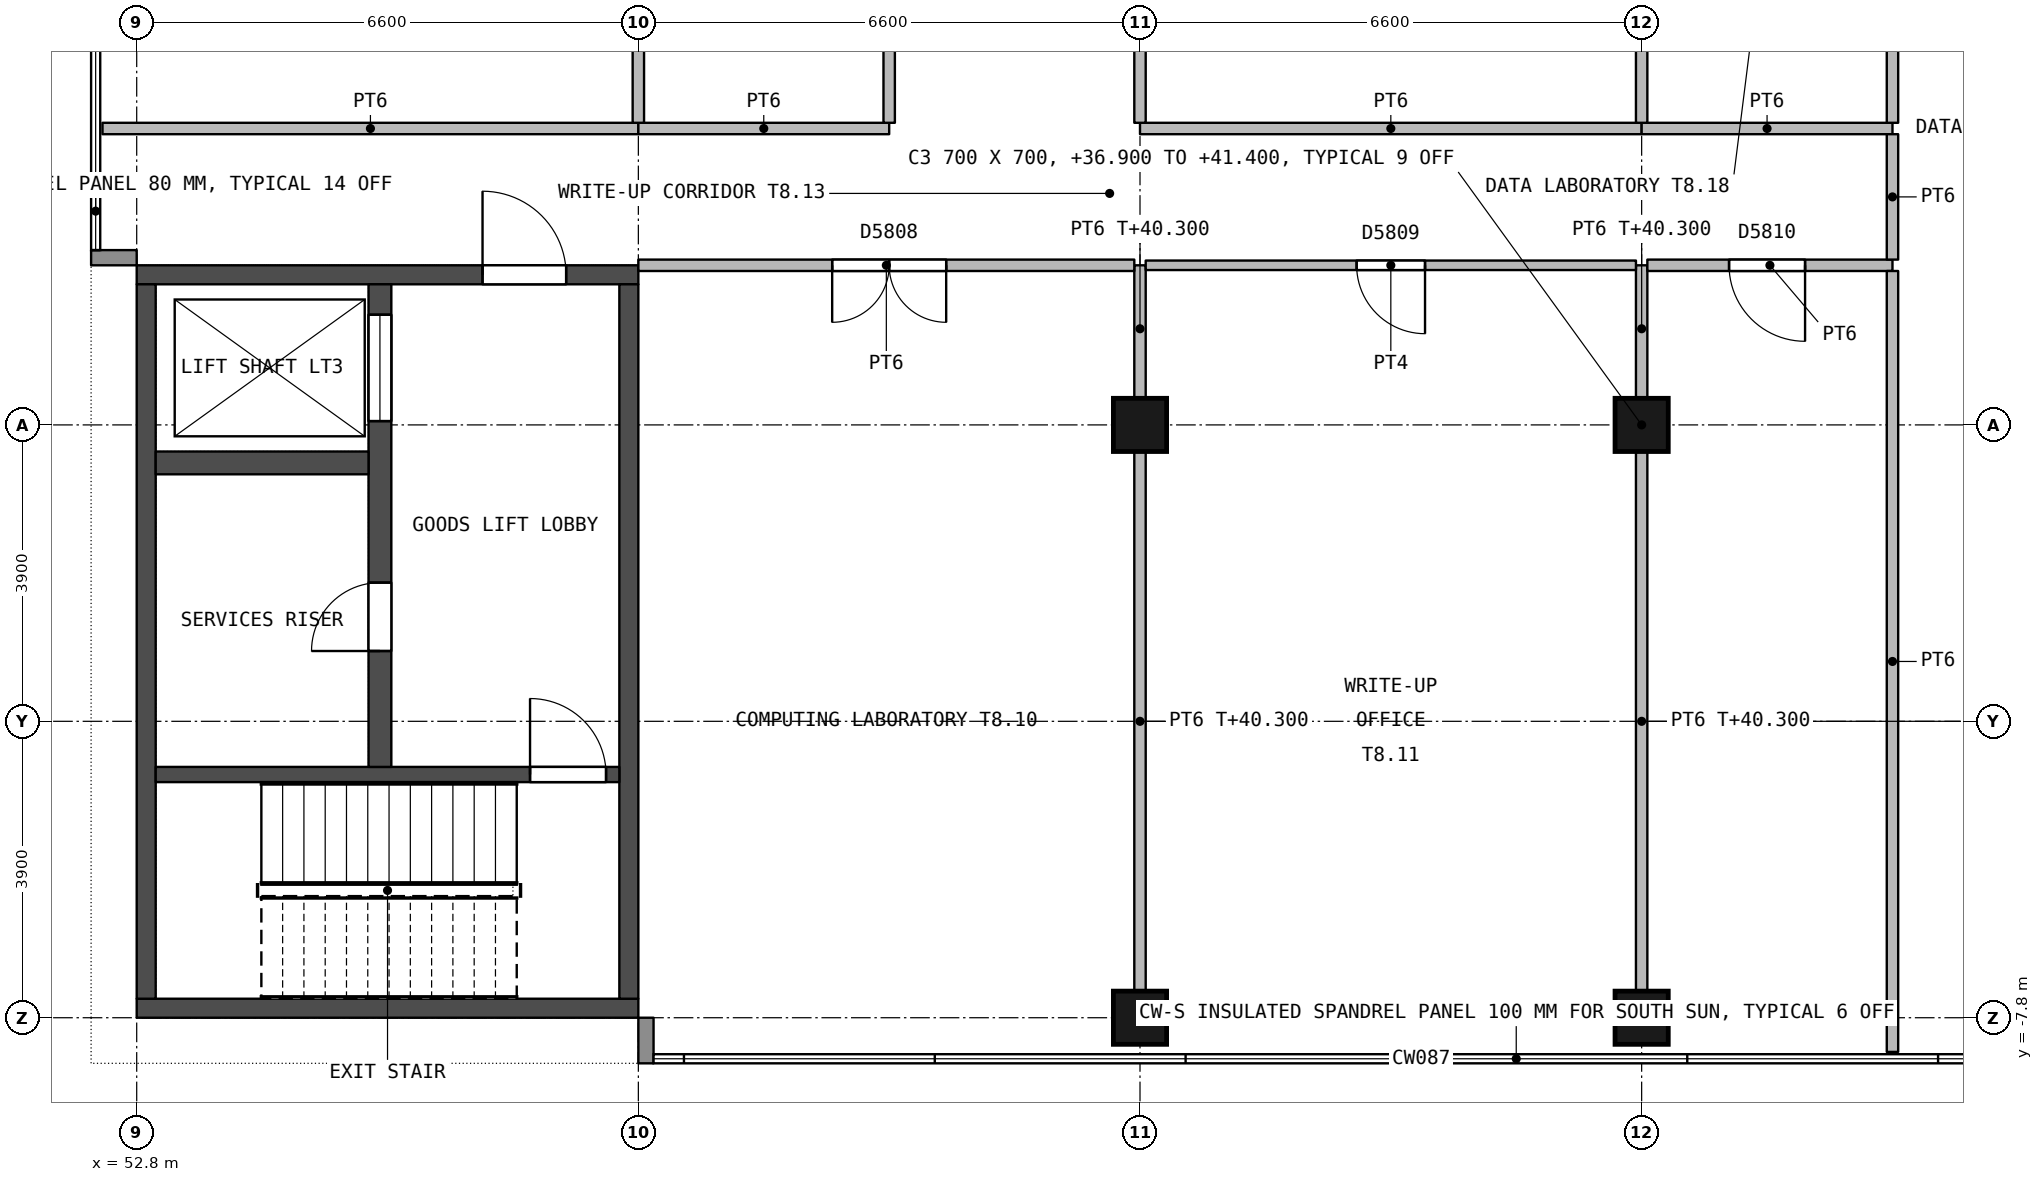
"""IFC4 building model, lengths in metres.
Left out: names, types, materials, properties, quantities, classifications, styles, units other than length and angle.
Written with IfcOpenShell. Run it as: python <this file> out.ifc"""

import sys

from ifc_helpers import new_model, si_unit, direction, frame, frame_2d, origin, origin_2d, place, context, subcontext, project, spatial, rectangle, extrude, element, fill, save


model = new_model("IFC4")
c1 = context("Model", 3, precision=1e-05, world=origin(), true_north=direction((0.0, 1.0)))
c2 = subcontext(c1, "Body", "Model", "MODEL_VIEW")
j1 = project(units=[si_unit("LENGTHUNIT", "METRE"), si_unit("PLANEANGLEUNIT", "RADIAN")], contexts=[c1])
p1 = place(None, origin())
s1 = spatial("IfcSite", under=j1, at=p1, CompositionType="ELEMENT")
p2 = place(p1, origin())
s2 = spatial("IfcBuilding", under=s1, at=p2, CompositionType="ELEMENT")
p3 = place(p2, frame((0.0, 0.0, 36.9)))
s3 = spatial("IfcBuildingStorey", under=s2, at=p3, CompositionType="ELEMENT", Elevation=36.9)
for number, where, z_axis, x_axis in (
    (1, (66.0, -7.8, 0.0), (0.0, 0.0, 1.0), (1.0, 0.0, 0.0)),
    (2, (66.0, 0.0, 0.0), (0.0, 0.0, 1.0), (1.0, 0.0, 0.0)),
    (3, (72.6, -7.8, 0.0), (0.0, 0.0, 1.0), (1.0, 0.0, 0.0)),
    (4, (72.6, 0.0, 0.0), (0.0, 0.0, 1.0), (1.0, 0.0, 0.0)),
):
    element("IfcColumn", number, at=place(p3, frame(where, z_axis=z_axis, x_axis=x_axis)), inside=s3, PredefinedType="COLUMN", context=c2, shape_type="SweptSolid", body=[
        extrude(rectangle(XDim=0.7, YDim=0.7, at=origin_2d()), origin(), (0.0, 0.0, 1.0), 4.5),
    ])
p4 = place(p3, frame((59.4, 1.975, 0.0), z_axis=(0.0, 0.0, 1.0), x_axis=(-1.0, 0.0, 0.0)))
e5 = element("IfcWall", 5, at=p4, inside=s3, PredefinedType="SHEAR", context=c2, shape_type="SweptSolid", body=[
    extrude(rectangle(XDim=6.6, YDim=0.25, at=frame_2d((3.3, 0.0))), origin(), (0.0, 0.0, 1.0), 4.2),
])
p5 = place(p4, frame((0.95, 0.0, 0.0)))
e6 = element("IfcOpeningElement", 6, at=p5, cuts=e5, PredefinedType="OPENING", context=c2, shape_type="SweptSolid", body=[
    extrude(rectangle(XDim=1.1, YDim=2.1, at=frame_2d((0.55, 1.05))), frame((0.0, 0.135, 0.0), z_axis=(0.0, -1.0, 0.0), x_axis=(1.0, 0.0, 0.0)), (0.0, 0.0, 1.0), 0.27),
])
p6 = place(p3, frame((59.4, -7.675, 0.0), z_axis=(0.0, 0.0, 1.0), x_axis=(-1.0, 0.0, 0.0)))
e7 = element("IfcWall", 7, at=p6, inside=s3, PredefinedType="SHEAR", context=c2, shape_type="SweptSolid", body=[
    extrude(rectangle(XDim=6.6, YDim=0.25, at=frame_2d((3.3, 0.0))), origin(), (0.0, 0.0, 1.0), 4.2),
])
for number, where, z_axis, x_axis in (
    (8, (59.275, 1.85, 0.0), (0.0, 0.0, 1.0), (0.0, -1.0, 0.0)),
    (9, (52.925, 1.85, 0.0), (0.0, 0.0, 1.0), (0.0, -1.0, 0.0)),
):
    element("IfcWall", number, at=place(p3, frame(where, z_axis=z_axis, x_axis=x_axis)), inside=s3, PredefinedType="SHEAR", context=c2, shape_type="SweptSolid", body=[
        extrude(rectangle(XDim=9.4, YDim=0.25, at=frame_2d((4.7, 0.0))), origin(), (0.0, 0.0, 1.0), 4.2),
    ])
p7 = place(p3, frame((59.15, -4.6, 0.0), z_axis=(0.0, 0.0, 1.0), x_axis=(-1.0, 0.0, 0.0)))
e10 = element("IfcWall", 10, at=p7, inside=s3, PredefinedType="SHEAR", context=c2, shape_type="SweptSolid", body=[
    extrude(rectangle(XDim=6.1, YDim=0.2, at=frame_2d((3.05, 0.0))), origin(), (0.0, 0.0, 1.0), 4.2),
])
p8 = place(p7, frame((0.175, 0.0, 0.0)))
e11 = element("IfcOpeningElement", 11, at=p8, cuts=e10, PredefinedType="OPENING", context=c2, shape_type="SweptSolid", body=[
    extrude(rectangle(XDim=1.0, YDim=2.1, at=frame_2d((0.5, 1.05))), frame((0.0, 0.11, 0.0), z_axis=(0.0, -1.0, 0.0), x_axis=(1.0, 0.0, 0.0)), (0.0, 0.0, 1.0), 0.22),
])
p9 = place(p3, frame((56.0, 1.85, 0.0), z_axis=(0.0, 0.0, 1.0), x_axis=(0.0, -1.0, 0.0)))
e12 = element("IfcWall", 12, at=p9, inside=s3, PredefinedType="SHEAR", context=c2, shape_type="SweptSolid", body=[
    extrude(rectangle(XDim=6.35, YDim=0.3, at=frame_2d((3.175, 0.0))), origin(), (0.0, 0.0, 1.0), 4.2),
])
p10 = place(p9, frame((3.925, 0.0, 0.0)))
e13 = element("IfcOpeningElement", 13, at=p10, cuts=e12, PredefinedType="OPENING", context=c2, shape_type="SweptSolid", body=[
    extrude(rectangle(XDim=0.9, YDim=2.1, at=frame_2d((0.45, 1.05))), frame((0.0, 0.16, 0.0), z_axis=(0.0, -1.0, 0.0), x_axis=(1.0, 0.0, 0.0)), (0.0, 0.0, 1.0), 0.32),
])
p11 = place(p9, frame((0.4, 0.0, 0.0)))
e14 = element("IfcOpeningElement", 14, at=p11, cuts=e12, PredefinedType="OPENING", context=c2, shape_type="SweptSolid", body=[
    extrude(rectangle(XDim=1.4, YDim=2.4, at=frame_2d((0.7, 1.2))), frame((0.0, 0.16, 0.0), z_axis=(0.0, -1.0, 0.0), x_axis=(1.0, 0.0, 0.0)), (0.0, 0.0, 1.0), 0.32),
])
p12 = place(p3, frame((55.85, -0.5, 0.0), z_axis=(0.0, 0.0, 1.0), x_axis=(-1.0, 0.0, 0.0)))
e15 = element("IfcWall", 15, at=p12, inside=s3, PredefinedType="SHEAR", context=c2, shape_type="SweptSolid", body=[
    extrude(rectangle(XDim=2.8, YDim=0.3, at=frame_2d((1.4, 0.0))), origin(), (0.0, 0.0, 1.0), 4.2),
])
p13 = place(p3, frame((59.5, -7.8, 0.0), z_axis=(0.0, 0.0, 1.0), x_axis=(0.0, -1.0, 0.0)))
e16 = element("IfcWall", 16, at=p13, inside=s3, PredefinedType="STANDARD", context=c2, shape_type="SweptSolid", body=[
    extrude(rectangle(XDim=0.6, YDim=0.2, at=frame_2d((0.3, 0.0))), origin(), (0.0, 0.0, 1.0), 3.55),
])
p14 = place(p3, frame((52.8, 2.2, 0.0), z_axis=(0.0, 0.0, 1.0), x_axis=(-1.0, 0.0, 0.0)))
e17 = element("IfcWall", 17, at=p14, inside=s3, PredefinedType="STANDARD", context=c2, shape_type="SweptSolid", body=[
    extrude(rectangle(XDim=0.6, YDim=0.2, at=frame_2d((0.3, 0.0))), origin(), (0.0, 0.0, 1.0), 3.55),
])
p15 = place(p3, frame((66.0, -7.45, 0.0), z_axis=(0.0, 0.0, 1.0), x_axis=(0.0, 1.0, 0.0)))
e18 = element("IfcWall", 18, at=p15, inside=s3, PredefinedType="PARTITIONING", context=c2, shape_type="SweptSolid", body=[
    extrude(rectangle(XDim=7.1, YDim=0.15, at=frame_2d((3.55, 0.0))), origin(), (0.0, 0.0, 1.0), 3.4),
])
p16 = place(p3, frame((66.0, 0.35, 0.0), z_axis=(0.0, 0.0, 1.0), x_axis=(0.0, 1.0, 0.0)))
e19 = element("IfcWall", 19, at=p16, inside=s3, PredefinedType="PARTITIONING", context=c2, shape_type="SweptSolid", body=[
    extrude(rectangle(XDim=1.75, YDim=0.15, at=frame_2d((0.875, 0.0))), origin(), (0.0, 0.0, 1.0), 3.4),
])
p17 = place(p3, frame((65.925, 2.1, 0.0), z_axis=(0.0, 0.0, 1.0), x_axis=(-1.0, 0.0, 0.0)))
e20 = element("IfcWall", 20, at=p17, inside=s3, PredefinedType="PARTITIONING", context=c2, shape_type="SweptSolid", body=[
    extrude(rectangle(XDim=6.525, YDim=0.15, at=frame_2d((3.262, 0.0))), origin(), (0.0, 0.0, 1.0), 4.2),
])
p18 = place(p17, frame((2.475, 0.0, 0.0)))
e21 = element("IfcOpeningElement", 21, at=p18, cuts=e20, PredefinedType="OPENING", context=c2, shape_type="SweptSolid", body=[
    extrude(rectangle(XDim=1.5, YDim=2.1, at=frame_2d((0.75, 1.05))), frame((0.0, 0.085, 0.0), z_axis=(0.0, -1.0, 0.0), x_axis=(1.0, 0.0, 0.0)), (0.0, 0.0, 1.0), 0.17),
])
p19 = place(p3, frame((72.6, -7.45, 0.0), z_axis=(0.0, 0.0, 1.0), x_axis=(0.0, 1.0, 0.0)))
e22 = element("IfcWall", 22, at=p19, inside=s3, PredefinedType="PARTITIONING", context=c2, shape_type="SweptSolid", body=[
    extrude(rectangle(XDim=7.1, YDim=0.15, at=frame_2d((3.55, 0.0))), origin(), (0.0, 0.0, 1.0), 3.4),
])
p20 = place(p3, frame((72.6, 0.35, 0.0), z_axis=(0.0, 0.0, 1.0), x_axis=(0.0, 1.0, 0.0)))
e23 = element("IfcWall", 23, at=p20, inside=s3, PredefinedType="PARTITIONING", context=c2, shape_type="SweptSolid", body=[
    extrude(rectangle(XDim=1.75, YDim=0.15, at=frame_2d((0.875, 0.0))), origin(), (0.0, 0.0, 1.0), 3.4),
])
p21 = place(p3, frame((72.525, 2.1, 0.0), z_axis=(0.0, 0.0, 1.0), x_axis=(-1.0, 0.0, 0.0)))
e24 = element("IfcWall", 24, at=p21, inside=s3, PredefinedType="PARTITIONING", context=c2, shape_type="SweptSolid", body=[
    extrude(rectangle(XDim=6.45, YDim=0.125, at=frame_2d((3.225, 0.0))), origin(), (0.0, 0.0, 1.0), 4.2),
])
p22 = place(p21, frame((2.775, 0.0, 0.0)))
e25 = element("IfcOpeningElement", 25, at=p22, cuts=e24, PredefinedType="OPENING", context=c2, shape_type="SweptSolid", body=[
    extrude(rectangle(XDim=0.9, YDim=2.1, at=frame_2d((0.45, 1.05))), frame((0.0, 0.073, 0.0), z_axis=(0.0, -1.0, 0.0), x_axis=(1.0, 0.0, 0.0)), (0.0, 0.0, 1.0), 0.145),
])
p23 = place(p3, frame((75.9, 2.1, 0.0), z_axis=(0.0, 0.0, 1.0), x_axis=(-1.0, 0.0, 0.0)))
e26 = element("IfcWall", 26, at=p23, inside=s3, PredefinedType="PARTITIONING", context=c2, shape_type="SweptSolid", body=[
    extrude(rectangle(XDim=3.225, YDim=0.15, at=frame_2d((1.612, 0.0))), origin(), (0.0, 0.0, 1.0), 4.2),
])
p24 = place(p23, frame((1.15, 0.0, 0.0)))
e27 = element("IfcOpeningElement", 27, at=p24, cuts=e26, PredefinedType="OPENING", context=c2, shape_type="SweptSolid", body=[
    extrude(rectangle(XDim=1.0, YDim=2.1, at=frame_2d((0.5, 1.05))), frame((0.0, 0.085, 0.0), z_axis=(0.0, -1.0, 0.0), x_axis=(1.0, 0.0, 0.0)), (0.0, 0.0, 1.0), 0.17),
])
p25 = place(p3, frame((75.9, -8.25, 0.0), z_axis=(0.0, 0.0, 1.0), x_axis=(0.0, 1.0, 0.0)))
e28 = element("IfcWall", 28, at=p25, inside=s3, PredefinedType="PARTITIONING", context=c2, shape_type="SweptSolid", body=[
    extrude(rectangle(XDim=10.275, YDim=0.15, at=frame_2d((5.137, 0.0))), origin(), (0.0, 0.0, 1.0), 4.2),
])
p26 = place(p3, frame((59.4, 3.9, 0.0), z_axis=(0.0, 0.0, 1.0), x_axis=(-1.0, 0.0, 0.0)))
e29 = element("IfcWall", 29, at=p26, inside=s3, PredefinedType="PARTITIONING", context=c2, shape_type="SweptSolid", body=[
    extrude(rectangle(XDim=7.05, YDim=0.15, at=frame_2d((3.525, 0.0))), origin(), (0.0, 0.0, 1.0), 4.2),
])
p27 = place(p3, frame((62.7, 3.9, 0.0), z_axis=(0.0, 0.0, 1.0), x_axis=(-1.0, 0.0, 0.0)))
e30 = element("IfcWall", 30, at=p27, inside=s3, PredefinedType="PARTITIONING", context=c2, shape_type="SweptSolid", body=[
    extrude(rectangle(XDim=3.3, YDim=0.15, at=frame_2d((1.65, 0.0))), origin(), (0.0, 0.0, 1.0), 4.2),
])
p28 = place(p3, frame((72.6, 3.9, 0.0), z_axis=(0.0, 0.0, 1.0), x_axis=(-1.0, 0.0, 0.0)))
e31 = element("IfcWall", 31, at=p28, inside=s3, PredefinedType="PARTITIONING", context=c2, shape_type="SweptSolid", body=[
    extrude(rectangle(XDim=6.6, YDim=0.15, at=frame_2d((3.3, 0.0))), origin(), (0.0, 0.0, 1.0), 4.2),
])
p29 = place(p3, frame((75.9, 3.9, 0.0), z_axis=(0.0, 0.0, 1.0), x_axis=(-1.0, 0.0, 0.0)))
e32 = element("IfcWall", 32, at=p29, inside=s3, PredefinedType="PARTITIONING", context=c2, shape_type="SweptSolid", body=[
    extrude(rectangle(XDim=3.3, YDim=0.15, at=frame_2d((1.65, 0.0))), origin(), (0.0, 0.0, 1.0), 4.2),
])
p30 = place(p3, frame((75.9, 2.175, 0.0), z_axis=(0.0, 0.0, 1.0), x_axis=(0.0, 1.0, 0.0)))
e33 = element("IfcWall", 33, at=p30, inside=s3, PredefinedType="PARTITIONING", context=c2, shape_type="SweptSolid", body=[
    extrude(rectangle(XDim=1.65, YDim=0.15, at=frame_2d((0.825, 0.0))), origin(), (0.0, 0.0, 1.0), 4.2),
])
p31 = place(p3, frame((59.4, 3.975, 0.0), z_axis=(0.0, 0.0, 1.0), x_axis=(0.0, 1.0, 0.0)))
e34 = element("IfcWall", 34, at=p31, inside=s3, PredefinedType="PARTITIONING", context=c2, shape_type="SweptSolid", body=[
    extrude(rectangle(XDim=5.575, YDim=0.15, at=frame_2d((2.788, 0.0))), origin(), (0.0, 0.0, 1.0), 3.4),
])
p32 = place(p3, frame((62.7, 9.825, 0.0), z_axis=(0.0, 0.0, 1.0), x_axis=(0.0, -1.0, 0.0)))
e35 = element("IfcWall", 35, at=p32, inside=s3, PredefinedType="PARTITIONING", context=c2, shape_type="SweptSolid", body=[
    extrude(rectangle(XDim=5.85, YDim=0.15, at=frame_2d((2.925, 0.0))), origin(), (0.0, 0.0, 1.0), 4.2),
])
p33 = place(p32, frame((2.425, 0.0, 0.0)))
e36 = element("IfcOpeningElement", 36, at=p33, cuts=e35, PredefinedType="OPENING", context=c2, shape_type="SweptSolid", body=[
    extrude(rectangle(XDim=1.0, YDim=2.1, at=frame_2d((0.5, 1.05))), frame((0.0, 0.085, 0.0), z_axis=(0.0, -1.0, 0.0), x_axis=(1.0, 0.0, 0.0)), (0.0, 0.0, 1.0), 0.17),
])
for number, where, z_axis, x_axis in (
    (37, (66.0, 3.975, 0.0), (0.0, 0.0, 1.0), (0.0, 1.0, 0.0)),
    (38, (72.6, 3.975, 0.0), (0.0, 0.0, 1.0), (0.0, 1.0, 0.0)),
):
    element("IfcWall", number, at=place(p3, frame(where, z_axis=z_axis, x_axis=x_axis)), inside=s3, PredefinedType="PARTITIONING", context=c2, shape_type="SweptSolid", body=[
        extrude(rectangle(XDim=5.575, YDim=0.15, at=frame_2d((2.788, 0.0))), origin(), (0.0, 0.0, 1.0), 3.4),
    ])
p34 = place(p3, frame((75.9, 3.975, 0.0), z_axis=(0.0, 0.0, 1.0), x_axis=(0.0, 1.0, 0.0)))
e39 = element("IfcWall", 39, at=p34, inside=s3, PredefinedType="PARTITIONING", context=c2, shape_type="SweptSolid", body=[
    extrude(rectangle(XDim=5.85, YDim=0.15, at=frame_2d((2.925, 0.0))), origin(), (0.0, 0.0, 1.0), 4.2),
])
p35 = place(p10, origin())
e40 = element("IfcDoor", 40, at=p35, inside=s3, OperationType="SINGLE_SWING_RIGHT", PredefinedType="DOOR", context=c2, shape_type="SweptSolid", body=[
    extrude(rectangle(XDim=0.9, YDim=2.1, at=frame_2d((0.45, 1.05))), frame((0.0, 0.025, 0.0), z_axis=(0.0, -1.0, 0.0), x_axis=(1.0, 0.0, 0.0)), (0.0, 0.0, 1.0), 0.05),
])
fill(e13, e40)
p36 = place(p5, origin())
e41 = element("IfcDoor", 41, at=p36, inside=s3, OperationType="SINGLE_SWING_RIGHT", PredefinedType="DOOR", context=c2, shape_type="SweptSolid", body=[
    extrude(rectangle(XDim=1.1, YDim=2.1, at=frame_2d((0.55, 1.05))), frame((0.0, 0.025, 0.0), z_axis=(0.0, -1.0, 0.0), x_axis=(1.0, 0.0, 0.0)), (0.0, 0.0, 1.0), 0.05),
])
fill(e6, e41)
p37 = place(p8, origin())
e42 = element("IfcDoor", 42, at=p37, inside=s3, OperationType="SINGLE_SWING_RIGHT", PredefinedType="DOOR", context=c2, shape_type="SweptSolid", body=[
    extrude(rectangle(XDim=1.0, YDim=2.1, at=frame_2d((0.5, 1.05))), frame((0.0, 0.025, 0.0), z_axis=(0.0, -1.0, 0.0), x_axis=(1.0, 0.0, 0.0)), (0.0, 0.0, 1.0), 0.05),
])
fill(e11, e42)
p38 = place(p11, origin())
e43 = element("IfcDoor", 43, at=p38, inside=s3, OperationType="DOUBLE_DOOR_SLIDING", PredefinedType="NOTDEFINED", context=c2, shape_type="SweptSolid", body=[
    extrude(rectangle(XDim=1.4, YDim=2.4, at=frame_2d((0.7, 1.2))), frame((0.0, 0.025, 0.0), z_axis=(0.0, -1.0, 0.0), x_axis=(1.0, 0.0, 0.0)), (0.0, 0.0, 1.0), 0.05),
])
fill(e14, e43)
p39 = place(p18, origin())
e44 = element("IfcDoor", 44, at=p39, inside=s3, OperationType="DOUBLE_DOOR_SINGLE_SWING", PredefinedType="DOOR", context=c2, shape_type="SweptSolid", body=[
    extrude(rectangle(XDim=1.5, YDim=2.1, at=frame_2d((0.75, 1.05))), frame((0.0, 0.027, 0.0), z_axis=(0.0, -1.0, 0.0), x_axis=(1.0, 0.0, 0.0)), (0.0, 0.0, 1.0), 0.054),
])
fill(e21, e44)
p40 = place(p22, origin())
e45 = element("IfcDoor", 45, at=p40, inside=s3, OperationType="SINGLE_SWING_LEFT", PredefinedType="DOOR", context=c2, shape_type="SweptSolid", body=[
    extrude(rectangle(XDim=0.9, YDim=2.1, at=frame_2d((0.45, 1.05))), frame((0.0, 0.027, 0.0), z_axis=(0.0, -1.0, 0.0), x_axis=(1.0, 0.0, 0.0)), (0.0, 0.0, 1.0), 0.054),
])
fill(e25, e45)
p41 = place(p24, origin())
e46 = element("IfcDoor", 46, at=p41, inside=s3, OperationType="SINGLE_SWING_LEFT", PredefinedType="DOOR", context=c2, shape_type="SweptSolid", body=[
    extrude(rectangle(XDim=1.0, YDim=2.1, at=frame_2d((0.5, 1.05))), frame((0.0, 0.027, 0.0), z_axis=(0.0, -1.0, 0.0), x_axis=(1.0, 0.0, 0.0)), (0.0, 0.0, 1.0), 0.054),
])
fill(e27, e46)
save(model, sys.argv[1])
